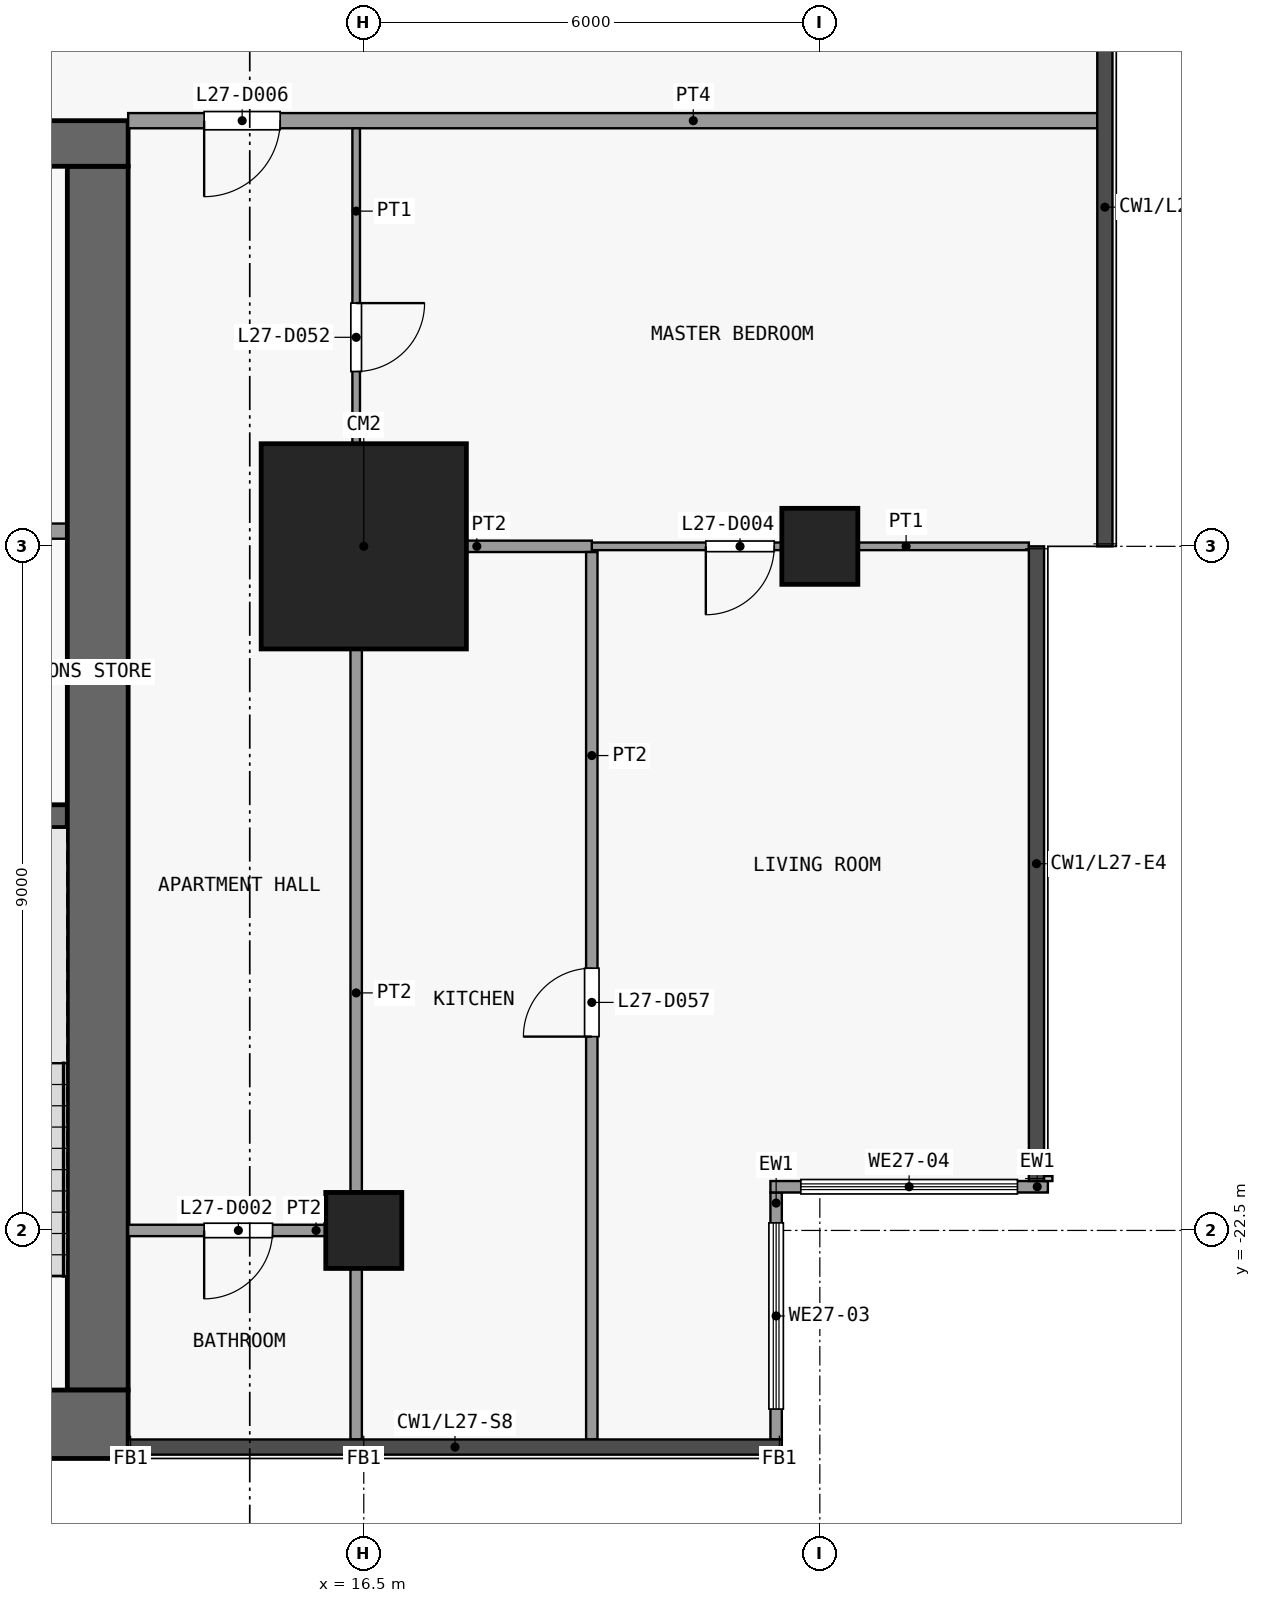
"""IFC4 building model, lengths in metres.
Left out: names, types, materials, properties, quantities, classifications, styles, units other than length and angle.
Written with IfcOpenShell. Run it as: python <this file> out.ifc"""

import sys

from ifc_helpers import new_model, si_unit, direction, frame, frame_2d, origin, origin_2d, place, context, subcontext, project, spatial, rectangle, extrude, element, fill, save


model = new_model("IFC4")
c1 = context("Model", 3, precision=1e-05, world=origin(), true_north=direction((0.0, 1.0)))
c2 = subcontext(c1, "Body", "Model", "MODEL_VIEW")
j1 = project(units=[si_unit("LENGTHUNIT", "METRE"), si_unit("PLANEANGLEUNIT", "RADIAN")], contexts=[c1])
p1 = place(None, origin())
s1 = spatial("IfcSite", under=j1, at=p1, CompositionType="ELEMENT")
p2 = place(p1, origin())
s2 = spatial("IfcBuilding", under=s1, at=p2, CompositionType="ELEMENT")
p3 = place(p2, frame((0.0, 0.0, 109.9)))
s3 = spatial("IfcBuildingStorey", under=s2, at=p3, CompositionType="ELEMENT", Elevation=109.9)
p4 = place(p3, frame((16.5, -22.5, 0.0), z_axis=(0.0, 0.0, 1.0), x_axis=(1.0, 0.0, 0.0)))
e1 = element("IfcColumn", 1, at=p4, inside=s3, PredefinedType="COLUMN", context=c2, shape_type="SweptSolid", body=[
    extrude(rectangle(XDim=1.0, YDim=1.0, at=origin_2d()), origin(), (0.0, 0.0, 1.0), 3.6),
])
p5 = place(p3, frame((16.5, -13.5, 0.0), z_axis=(0.0, 0.0, 1.0), x_axis=(1.0, 0.0, 0.0)))
e2 = element("IfcColumn", 2, at=p5, inside=s3, PredefinedType="COLUMN", context=c2, shape_type="SweptSolid", body=[
    extrude(rectangle(XDim=2.7, YDim=2.7, at=origin_2d()), origin(), (0.0, 0.0, 1.0), 3.6),
])
p6 = place(p3, frame((22.5, -13.5, 0.0), z_axis=(0.0, 0.0, 1.0), x_axis=(1.0, 0.0, 0.0)))
e3 = element("IfcColumn", 3, at=p6, inside=s3, PredefinedType="COLUMN", context=c2, shape_type="SweptSolid", body=[
    extrude(rectangle(XDim=1.0, YDim=1.0, at=origin_2d()), origin(), (0.0, 0.0, 1.0), 3.6),
])
p7 = place(p3, frame((-13.4, -25.05, 0.0), z_axis=(0.0, 0.0, 1.0), x_axis=(1.0, 0.0, 0.0)))
e4 = element("IfcWall", 4, at=p7, inside=s3, PredefinedType="SHEAR", context=c2, shape_type="SweptSolid", body=[
    extrude(rectangle(XDim=26.8, YDim=0.9, at=frame_2d((13.4, 0.0))), origin(), (0.0, 0.0, 1.0), 3.3),
])
p8 = place(p3, frame((-13.4, -8.2, 0.0), z_axis=(0.0, 0.0, 1.0), x_axis=(1.0, 0.0, 0.0)))
e5 = element("IfcWall", 5, at=p8, inside=s3, PredefinedType="SHEAR", context=c2, shape_type="SweptSolid", body=[
    extrude(rectangle(XDim=26.8, YDim=0.6, at=frame_2d((13.4, 0.0))), origin(), (0.0, 0.0, 1.0), 3.3),
])
p9 = place(p8, frame((7.7, 0.0, 0.0)))
e6 = element("IfcOpeningElement", 6, at=p9, cuts=e5, PredefinedType="OPENING", context=c2, shape_type="SweptSolid", body=[
    extrude(rectangle(XDim=1.8, YDim=2.1, at=frame_2d((0.9, 1.05))), frame((0.0, 0.31, 0.0), z_axis=(0.0, -1.0, 0.0), x_axis=(1.0, 0.0, 0.0)), (0.0, 0.0, 1.0), 0.62),
])
p10 = place(p8, frame((17.3, 0.0, 0.0)))
e7 = element("IfcOpeningElement", 7, at=p10, cuts=e5, PredefinedType="OPENING", context=c2, shape_type="SweptSolid", body=[
    extrude(rectangle(XDim=1.8, YDim=2.1, at=frame_2d((0.9, 1.05))), frame((0.0, 0.31, 0.0), z_axis=(0.0, -1.0, 0.0), x_axis=(1.0, 0.0, 0.0)), (0.0, 0.0, 1.0), 0.62),
])
p11 = place(p8, frame((2.625, 0.0, 0.0)))
e8 = element("IfcOpeningElement", 8, at=p11, cuts=e5, PredefinedType="OPENING", context=c2, shape_type="SweptSolid", body=[
    extrude(rectangle(XDim=0.9, YDim=2.1, at=frame_2d((0.45, 1.05))), frame((0.0, 0.31, 0.0), z_axis=(0.0, -1.0, 0.0), x_axis=(1.0, 0.0, 0.0)), (0.0, 0.0, 1.0), 0.62),
])
p12 = place(p8, frame((23.275, 0.0, 0.0)))
e9 = element("IfcOpeningElement", 9, at=p12, cuts=e5, PredefinedType="OPENING", context=c2, shape_type="SweptSolid", body=[
    extrude(rectangle(XDim=0.9, YDim=2.1, at=frame_2d((0.45, 1.05))), frame((0.0, 0.31, 0.0), z_axis=(0.0, -1.0, 0.0), x_axis=(1.0, 0.0, 0.0)), (0.0, 0.0, 1.0), 0.62),
])
p13 = place(p3, frame((13.0, -24.6, 0.0), z_axis=(0.0, 0.0, 1.0), x_axis=(0.0, 1.0, 0.0)))
e10 = element("IfcWall", 10, at=p13, inside=s3, PredefinedType="SHEAR", context=c2, shape_type="SweptSolid", body=[
    extrude(rectangle(XDim=16.1, YDim=0.8, at=frame_2d((8.05, 0.0))), origin(), (0.0, 0.0, 1.0), 3.3),
])
p14 = place(p3, frame((9.5, -17.05, 0.0), z_axis=(0.0, 0.0, 1.0), x_axis=(1.0, 0.0, 0.0)))
e11 = element("IfcWall", 11, at=p14, inside=s3, PredefinedType="SHEAR", context=c2, shape_type="SweptSolid", body=[
    extrude(rectangle(XDim=3.1, YDim=0.3, at=frame_2d((1.55, 0.0))), origin(), (0.0, 0.0, 1.0), 3.3),
])
p15 = place(p3, frame((11.15, -13.3, 0.0), z_axis=(0.0, 0.0, 1.0), x_axis=(1.0, 0.0, 0.0)))
e12 = element("IfcWall", 12, at=p15, inside=s3, PredefinedType="PARTITIONING", context=c2, shape_type="SweptSolid", body=[
    extrude(rectangle(XDim=1.45, YDim=0.2, at=frame_2d((0.725, 0.0))), origin(), (0.0, 0.0, 1.0), 3.3),
])
p16 = place(p3, frame((21.925, -22.0, 0.0), z_axis=(0.0, 0.0, 1.0), x_axis=(0.0, -1.0, 0.0)))
e13 = element("IfcWall", 13, at=p16, inside=s3, PredefinedType="SOLIDWALL", context=c2, shape_type="SweptSolid", body=[
    extrude(rectangle(XDim=3.25, YDim=0.15, at=frame_2d((1.625, 0.0))), origin(), (0.0, 0.0, 1.0), 3.3),
])
p17 = place(p16, frame((0.4, 0.0, 0.9)))
e14 = element("IfcOpeningElement", 14, at=p17, cuts=e13, PredefinedType="OPENING", context=c2, shape_type="SweptSolid", body=[
    extrude(rectangle(XDim=2.45, YDim=2.4, at=frame_2d((1.225, 1.2))), frame((0.0, 0.085, 0.0), z_axis=(0.0, -1.0, 0.0), x_axis=(1.0, 0.0, 0.0)), (0.0, 0.0, 1.0), 0.17),
])
p18 = place(p3, frame((25.5, -21.925, 0.0), z_axis=(0.0, 0.0, 1.0), x_axis=(-1.0, 0.0, 0.0)))
e15 = element("IfcWall", 15, at=p18, inside=s3, PredefinedType="SOLIDWALL", context=c2, shape_type="SweptSolid", body=[
    extrude(rectangle(XDim=3.65, YDim=0.15, at=frame_2d((1.825, 0.0))), origin(), (0.0, 0.0, 1.0), 3.3),
])
p19 = place(p18, frame((0.4, 0.0, 0.9)))
e16 = element("IfcOpeningElement", 16, at=p19, cuts=e15, PredefinedType="OPENING", context=c2, shape_type="SweptSolid", body=[
    extrude(rectangle(XDim=2.85, YDim=2.4, at=frame_2d((1.425, 1.2))), frame((0.0, 0.085, 0.0), z_axis=(0.0, -1.0, 0.0), x_axis=(1.0, 0.0, 0.0)), (0.0, 0.0, 1.0), 0.17),
])
p20 = place(p3, frame((13.4, -22.5, 0.0), z_axis=(0.0, 0.0, 1.0), x_axis=(1.0, 0.0, 0.0)))
e17 = element("IfcWall", 17, at=p20, inside=s3, PredefinedType="PARTITIONING", context=c2, shape_type="SweptSolid", body=[
    extrude(rectangle(XDim=2.925, YDim=0.15, at=frame_2d((1.462, 0.0))), origin(), (0.0, 0.0, 1.0), 3.3),
])
p21 = place(p20, frame((1.0, 0.0, 0.0)))
e18 = element("IfcOpeningElement", 18, at=p21, cuts=e17, PredefinedType="OPENING", context=c2, shape_type="SweptSolid", body=[
    extrude(rectangle(XDim=0.9, YDim=2.1, at=frame_2d((0.45, 1.05))), frame((0.0, 0.085, 0.0), z_axis=(0.0, -1.0, 0.0), x_axis=(1.0, 0.0, 0.0)), (0.0, 0.0, 1.0), 0.17),
])
p22 = place(p3, frame((19.5, -13.5, 0.0), z_axis=(0.0, 0.0, 1.0), x_axis=(1.0, 0.0, 0.0)))
e19 = element("IfcWall", 19, at=p22, inside=s3, PredefinedType="PARTITIONING", context=c2, shape_type="SweptSolid", body=[
    extrude(rectangle(XDim=5.75, YDim=0.1, at=frame_2d((2.875, 0.0))), origin(), (0.0, 0.0, 1.0), 3.3),
])
p23 = place(p22, frame((1.5, 0.0, 0.0)))
e20 = element("IfcOpeningElement", 20, at=p23, cuts=e19, PredefinedType="OPENING", context=c2, shape_type="SweptSolid", body=[
    extrude(rectangle(XDim=0.9, YDim=2.1, at=frame_2d((0.45, 1.05))), frame((0.0, 0.06, 0.0), z_axis=(0.0, -1.0, 0.0), x_axis=(1.0, 0.0, 0.0)), (0.0, 0.0, 1.0), 0.12),
])
p24 = place(p3, frame((16.475, -13.5, 0.0), z_axis=(0.0, 0.0, 1.0), x_axis=(1.0, 0.0, 0.0)))
e21 = element("IfcWall", 21, at=p24, inside=s3, PredefinedType="PARTITIONING", context=c2, shape_type="SweptSolid", body=[
    extrude(rectangle(XDim=3.025, YDim=0.15, at=frame_2d((1.512, 0.0))), origin(), (0.0, 0.0, 1.0), 3.3),
])
p25 = place(p3, frame((13.4, -7.9, 0.0), z_axis=(0.0, 0.0, 1.0), x_axis=(1.0, 0.0, 0.0)))
e22 = element("IfcWall", 22, at=p25, inside=s3, PredefinedType="PARTITIONING", context=c2, shape_type="SweptSolid", body=[
    extrude(rectangle(XDim=12.75, YDim=0.2, at=frame_2d((6.375, 0.0))), origin(), (0.0, 0.0, 1.0), 3.3),
])
p26 = place(p25, frame((1.0, 0.0, 0.0)))
e23 = element("IfcOpeningElement", 23, at=p26, cuts=e22, PredefinedType="OPENING", context=c2, shape_type="SweptSolid", body=[
    extrude(rectangle(XDim=1.0, YDim=2.1, at=frame_2d((0.5, 1.05))), frame((0.0, 0.11, 0.0), z_axis=(0.0, -1.0, 0.0), x_axis=(1.0, 0.0, 0.0)), (0.0, 0.0, 1.0), 0.22),
])
p27 = place(p3, frame((16.4, -13.5, 0.0), z_axis=(0.0, 0.0, 1.0), x_axis=(0.0, 1.0, 0.0)))
e24 = element("IfcWall", 24, at=p27, inside=s3, PredefinedType="PARTITIONING", context=c2, shape_type="SweptSolid", body=[
    extrude(rectangle(XDim=5.5, YDim=0.1, at=frame_2d((2.75, 0.0))), origin(), (0.0, 0.0, 1.0), 3.3),
])
p28 = place(p27, frame((2.3, 0.0, 0.0)))
e25 = element("IfcOpeningElement", 25, at=p28, cuts=e24, PredefinedType="OPENING", context=c2, shape_type="SweptSolid", body=[
    extrude(rectangle(XDim=0.9, YDim=2.1, at=frame_2d((0.45, 1.05))), frame((0.0, 0.06, 0.0), z_axis=(0.0, -1.0, 0.0), x_axis=(1.0, 0.0, 0.0)), (0.0, 0.0, 1.0), 0.12),
])
p29 = place(p3, frame((16.4, -25.25, 0.0), z_axis=(0.0, 0.0, 1.0), x_axis=(0.0, 1.0, 0.0)))
e26 = element("IfcWall", 26, at=p29, inside=s3, PredefinedType="PARTITIONING", context=c2, shape_type="SweptSolid", body=[
    extrude(rectangle(XDim=11.75, YDim=0.15, at=frame_2d((5.875, 0.0))), origin(), (0.0, 0.0, 1.0), 3.3),
])
p30 = place(p3, frame((19.5, -25.25, 0.0), z_axis=(0.0, 0.0, 1.0), x_axis=(0.0, 1.0, 0.0)))
e27 = element("IfcWall", 27, at=p30, inside=s3, PredefinedType="PARTITIONING", context=c2, shape_type="SweptSolid", body=[
    extrude(rectangle(XDim=11.675, YDim=0.15, at=frame_2d((5.837, 0.0))), origin(), (0.0, 0.0, 1.0), 3.3),
])
p31 = place(p30, frame((5.3, 0.0, 0.0)))
e28 = element("IfcOpeningElement", 28, at=p31, cuts=e27, PredefinedType="OPENING", context=c2, shape_type="SweptSolid", body=[
    extrude(rectangle(XDim=0.9, YDim=2.1, at=frame_2d((0.45, 1.05))), frame((0.0, 0.085, 0.0), z_axis=(0.0, -1.0, 0.0), x_axis=(1.0, 0.0, 0.0)), (0.0, 0.0, 1.0), 0.17),
])
p32 = place(p17, origin())
e29 = element("IfcWindow", 29, at=p32, inside=s3, PartitioningType="SINGLE_PANEL", PredefinedType="WINDOW", context=c2, shape_type="SweptSolid", body=[
    extrude(rectangle(XDim=2.45, YDim=2.4, at=frame_2d((1.225, 1.2))), frame((0.0, 0.03, 0.0), z_axis=(0.0, -1.0, 0.0), x_axis=(1.0, 0.0, 0.0)), (0.0, 0.0, 1.0), 0.06),
])
fill(e14, e29)
p33 = place(p19, origin())
e30 = element("IfcWindow", 30, at=p33, inside=s3, PartitioningType="SINGLE_PANEL", PredefinedType="WINDOW", context=c2, shape_type="SweptSolid", body=[
    extrude(rectangle(XDim=2.85, YDim=2.4, at=frame_2d((1.425, 1.2))), frame((0.0, 0.03, 0.0), z_axis=(0.0, -1.0, 0.0), x_axis=(1.0, 0.0, 0.0)), (0.0, 0.0, 1.0), 0.06),
])
fill(e16, e30)
p34 = place(p21, origin())
e31 = element("IfcDoor", 31, at=p34, inside=s3, OperationType="SINGLE_SWING_LEFT", PredefinedType="DOOR", context=c2, shape_type="SweptSolid", body=[
    extrude(rectangle(XDim=0.9, YDim=2.1, at=frame_2d((0.45, 1.05))), frame((0.0, 0.025, 0.0), z_axis=(0.0, -1.0, 0.0), x_axis=(1.0, 0.0, 0.0)), (0.0, 0.0, 1.0), 0.05),
])
fill(e18, e31)
p35 = place(p23, origin())
e32 = element("IfcDoor", 32, at=p35, inside=s3, OperationType="SINGLE_SWING_LEFT", PredefinedType="DOOR", context=c2, shape_type="SweptSolid", body=[
    extrude(rectangle(XDim=0.9, YDim=2.1, at=frame_2d((0.45, 1.05))), frame((0.0, 0.025, 0.0), z_axis=(0.0, -1.0, 0.0), x_axis=(1.0, 0.0, 0.0)), (0.0, 0.0, 1.0), 0.05),
])
fill(e20, e32)
p36 = place(p26, origin())
e33 = element("IfcDoor", 33, at=p36, inside=s3, OperationType="SINGLE_SWING_LEFT", PredefinedType="DOOR", context=c2, shape_type="SweptSolid", body=[
    extrude(rectangle(XDim=1.0, YDim=2.1, at=frame_2d((0.5, 1.05))), frame((0.0, 0.025, 0.0), z_axis=(0.0, -1.0, 0.0), x_axis=(1.0, 0.0, 0.0)), (0.0, 0.0, 1.0), 0.05),
])
fill(e23, e33)
p37 = place(p28, origin())
e34 = element("IfcDoor", 34, at=p37, inside=s3, OperationType="SINGLE_SWING_RIGHT", PredefinedType="DOOR", context=c2, shape_type="SweptSolid", body=[
    extrude(rectangle(XDim=0.9, YDim=2.1, at=frame_2d((0.45, 1.05))), frame((0.0, 0.025, 0.0), z_axis=(0.0, -1.0, 0.0), x_axis=(1.0, 0.0, 0.0)), (0.0, 0.0, 1.0), 0.05),
])
fill(e25, e34)
p38 = place(p31, origin())
e35 = element("IfcDoor", 35, at=p38, inside=s3, OperationType="SINGLE_SWING_RIGHT", PredefinedType="DOOR", context=c2, shape_type="SweptSolid", body=[
    extrude(rectangle(XDim=0.9, YDim=2.1, at=frame_2d((0.45, 1.05))), frame((0.0, 0.025, 0.0), z_axis=(0.0, -1.0, 0.0), x_axis=(1.0, 0.0, 0.0)), (0.0, 0.0, 1.0), 0.05),
])
fill(e28, e35)
save(model, sys.argv[1])
